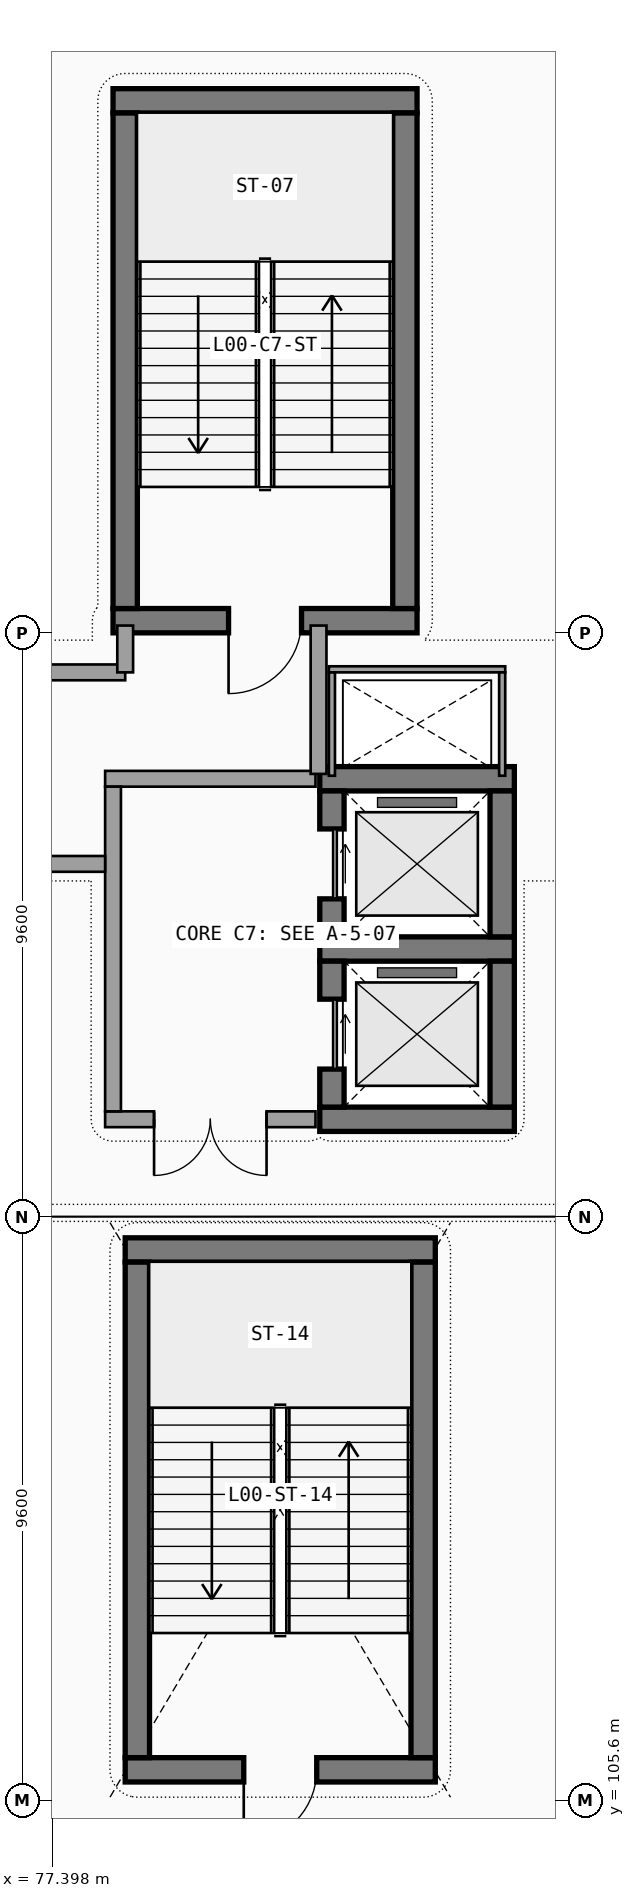
"""IFC4 building model, lengths in metres.
Left out: names, types, materials, properties, quantities, classifications, styles, units other than length and angle.
Written with IfcOpenShell. Run it as: python <this file> out.ifc"""

import sys

from ifc_helpers import new_model, si_unit, direction, frame, frame_2d, origin, place, context, subcontext, project, spatial, rectangle, extrude, element, fill, save


model = new_model("IFC4")
c1 = context("Model", 3, precision=1e-05, world=origin(), true_north=direction((0.0, 1.0)))
c2 = subcontext(c1, "Body", "Model", "MODEL_VIEW")
j1 = project(units=[si_unit("LENGTHUNIT", "METRE"), si_unit("PLANEANGLEUNIT", "RADIAN")], contexts=[c1])
p1 = place(None, origin())
s1 = spatial("IfcSite", under=j1, at=p1, CompositionType="ELEMENT")
p2 = place(p1, origin())
s2 = spatial("IfcBuilding", under=s1, at=p2, CompositionType="ELEMENT")
p3 = place(p2, origin())
s3 = spatial("IfcBuildingStorey", under=s2, at=p3, CompositionType="ELEMENT", Elevation=0.0)
p4 = place(p3, frame((78.4, 125.0, 0.0), z_axis=(0.0, 0.0, 1.0), x_axis=(1.0, 0.0, 0.0)))
e1 = element("IfcWall", 1, at=p4, inside=s3, PredefinedType="SHEAR", context=c2, shape_type="SweptSolid", body=[
    extrude(rectangle(XDim=5.0, YDim=0.4, at=frame_2d((2.5, 0.0))), origin(), (0.0, 0.0, 1.0), 4.5),
])
p5 = place(p4, frame((3.1, 0.0, 0.0), z_axis=(0.0, 0.0, 1.0), x_axis=(-1.0, 0.0, 0.0)))
e2 = element("IfcOpeningElement", 2, at=p5, cuts=e1, PredefinedType="OPENING", context=c2, shape_type="SweptSolid", body=[
    extrude(rectangle(XDim=1.2, YDim=2.2, at=frame_2d((0.6, 1.1))), frame((0.0, 0.21, 0.0), z_axis=(0.0, -1.0, 0.0), x_axis=(1.0, 0.0, 0.0)), (0.0, 0.0, 1.0), 0.42),
])
p6 = place(p3, frame((83.4, 133.55, 0.0), z_axis=(0.0, 0.0, 1.0), x_axis=(-1.0, 0.0, 0.0)))
e3 = element("IfcWall", 3, at=p6, inside=s3, PredefinedType="SHEAR", context=c2, shape_type="SweptSolid", body=[
    extrude(rectangle(XDim=5.0, YDim=0.4, at=frame_2d((2.5, 0.0))), origin(), (0.0, 0.0, 1.0), 4.5),
])
for number, where, z_axis, x_axis in (
    (4, (78.6, 133.35, 0.0), (0.0, 0.0, 1.0), (0.0, -1.0, 0.0)),
    (5, (83.2, 125.2, 0.0), (0.0, 0.0, 1.0), (0.0, 1.0, 0.0)),
):
    element("IfcWall", number, at=place(p3, frame(where, z_axis=z_axis, x_axis=x_axis)), inside=s3, PredefinedType="SHEAR", context=c2, shape_type="SweptSolid", body=[
        extrude(rectangle(XDim=8.15, YDim=0.4, at=frame_2d((4.075, 0.0))), origin(), (0.0, 0.0, 1.0), 4.5),
    ])
for number, where, z_axis, x_axis in (
    (6, (81.8, 116.8, 0.0), (0.0, 0.0, 1.0), (1.0, 0.0, 0.0)),
    (7, (85.0, 119.6, 0.0), (0.0, 0.0, 1.0), (-1.0, 0.0, 0.0)),
):
    element("IfcWall", number, at=place(p3, frame(where, z_axis=z_axis, x_axis=x_axis)), inside=s3, PredefinedType="SHEAR", context=c2, shape_type="SweptSolid", body=[
        extrude(rectangle(XDim=3.2, YDim=0.4, at=frame_2d((1.6, 0.0))), origin(), (0.0, 0.0, 1.0), 4.5),
    ])
p7 = place(p3, frame((82.0, 119.4, 0.0), z_axis=(0.0, 0.0, 1.0), x_axis=(0.0, -1.0, 0.0)))
e8 = element("IfcWall", 8, at=p7, inside=s3, PredefinedType="SHEAR", context=c2, shape_type="SweptSolid", body=[
    extrude(rectangle(XDim=2.4, YDim=0.4, at=frame_2d((1.2, 0.0))), origin(), (0.0, 0.0, 1.0), 4.5),
])
p8 = place(p7, frame((0.625, 0.0, 0.0), z_axis=(0.0, 0.0, 1.0), x_axis=(1.0, 0.0, 0.0)))
e9 = element("IfcOpeningElement", 9, at=p8, cuts=e8, PredefinedType="OPENING", context=c2, shape_type="SweptSolid", body=[
    extrude(rectangle(XDim=1.15, YDim=2.2, at=frame_2d((0.575, 1.1))), frame((0.0, 0.21, 0.0), z_axis=(0.0, -1.0, 0.0), x_axis=(1.0, 0.0, 0.0)), (0.0, 0.0, 1.0), 0.42),
])
p9 = place(p3, frame((84.8, 117.0, 0.0), z_axis=(0.0, 0.0, 1.0), x_axis=(0.0, 1.0, 0.0)))
e10 = element("IfcWall", 10, at=p9, inside=s3, PredefinedType="SHEAR", context=c2, shape_type="SweptSolid", body=[
    extrude(rectangle(XDim=2.4, YDim=0.4, at=frame_2d((1.2, 0.0))), origin(), (0.0, 0.0, 1.0), 4.5),
])
p10 = place(p3, frame((85.0, 122.4, 0.0), z_axis=(0.0, 0.0, 1.0), x_axis=(-1.0, 0.0, 0.0)))
e11 = element("IfcWall", 11, at=p10, inside=s3, PredefinedType="SHEAR", context=c2, shape_type="SweptSolid", body=[
    extrude(rectangle(XDim=3.2, YDim=0.4, at=frame_2d((1.6, 0.0))), origin(), (0.0, 0.0, 1.0), 4.5),
])
p11 = place(p3, frame((82.0, 122.2, 0.0), z_axis=(0.0, 0.0, 1.0), x_axis=(0.0, -1.0, 0.0)))
e12 = element("IfcWall", 12, at=p11, inside=s3, PredefinedType="SHEAR", context=c2, shape_type="SweptSolid", body=[
    extrude(rectangle(XDim=2.4, YDim=0.4, at=frame_2d((1.2, 0.0))), origin(), (0.0, 0.0, 1.0), 4.5),
])
p12 = place(p11, frame((0.625, 0.0, 0.0), z_axis=(0.0, 0.0, 1.0), x_axis=(1.0, 0.0, 0.0)))
e13 = element("IfcOpeningElement", 13, at=p12, cuts=e12, PredefinedType="OPENING", context=c2, shape_type="SweptSolid", body=[
    extrude(rectangle(XDim=1.15, YDim=2.2, at=frame_2d((0.575, 1.1))), frame((0.0, 0.21, 0.0), z_axis=(0.0, -1.0, 0.0), x_axis=(1.0, 0.0, 0.0)), (0.0, 0.0, 1.0), 0.42),
])
p13 = place(p3, frame((84.8, 119.8, 0.0), z_axis=(0.0, 0.0, 1.0), x_axis=(0.0, 1.0, 0.0)))
e14 = element("IfcWall", 14, at=p13, inside=s3, PredefinedType="SHEAR", context=c2, shape_type="SweptSolid", body=[
    extrude(rectangle(XDim=2.4, YDim=0.4, at=frame_2d((1.2, 0.0))), origin(), (0.0, 0.0, 1.0), 4.5),
])
p14 = place(p3, frame((84.85, 124.2, 0.0), z_axis=(0.0, 0.0, 1.0), x_axis=(-1.0, 0.0, 0.0)))
e15 = element("IfcWall", 15, at=p14, inside=s3, PredefinedType="PARTITIONING", context=c2, shape_type="SweptSolid", body=[
    extrude(rectangle(XDim=2.9, YDim=0.1, at=frame_2d((1.45, 0.0))), origin(), (0.0, 0.0, 1.0), 4.5),
])
for number, where, z_axis, x_axis in (
    (16, (82.0, 124.15, 0.0), (0.0, 0.0, 1.0), (0.0, -1.0, 0.0)),
    (17, (84.8, 122.45, 0.0), (0.0, 0.0, 1.0), (0.0, 1.0, 0.0)),
):
    element("IfcWall", number, at=place(p3, frame(where, z_axis=z_axis, x_axis=x_axis)), inside=s3, PredefinedType="PARTITIONING", context=c2, shape_type="SweptSolid", body=[
        extrude(rectangle(XDim=1.7, YDim=0.1, at=frame_2d((0.85, 0.0))), origin(), (0.0, 0.0, 1.0), 4.5),
    ])
p15 = place(p3, frame((78.27, 116.8, 0.0), z_axis=(0.0, 0.0, 1.0), x_axis=(1.0, 0.0, 0.0)))
e18 = element("IfcWall", 18, at=p15, inside=s3, PredefinedType="SOLIDWALL", context=c2, shape_type="SweptSolid", body=[
    extrude(rectangle(XDim=3.46, YDim=0.26, at=frame_2d((1.73, 0.0))), origin(), (0.0, 0.0, 1.0), 4.5),
])
p16 = place(p15, frame((2.655, 0.0, 0.0), z_axis=(0.0, 0.0, 1.0), x_axis=(-1.0, 0.0, 0.0)))
e19 = element("IfcOpeningElement", 19, at=p16, cuts=e18, PredefinedType="OPENING", context=c2, shape_type="SweptSolid", body=[
    extrude(rectangle(XDim=1.85, YDim=2.25, at=frame_2d((0.925, 1.125))), frame((0.0, 0.14, 0.0), z_axis=(0.0, -1.0, 0.0), x_axis=(1.0, 0.0, 0.0)), (0.0, 0.0, 1.0), 0.28),
])
p17 = place(p3, frame((81.73, 122.4, 0.0), z_axis=(0.0, 0.0, 1.0), x_axis=(-1.0, 0.0, 0.0)))
e20 = element("IfcWall", 20, at=p17, inside=s3, PredefinedType="SOLIDWALL", context=c2, shape_type="SweptSolid", body=[
    extrude(rectangle(XDim=3.46, YDim=0.26, at=frame_2d((1.73, 0.0))), origin(), (0.0, 0.0, 1.0), 4.5),
])
p18 = place(p3, frame((78.4, 122.27, 0.0), z_axis=(0.0, 0.0, 1.0), x_axis=(0.0, -1.0, 0.0)))
e21 = element("IfcWall", 21, at=p18, inside=s3, PredefinedType="SOLIDWALL", context=c2, shape_type="SweptSolid", body=[
    extrude(rectangle(XDim=5.34, YDim=0.26, at=frame_2d((2.67, 0.0))), origin(), (0.0, 0.0, 1.0), 4.5),
])
p19 = place(p3, frame((78.6, 106.1, 0.0), z_axis=(0.0, 0.0, 1.0), x_axis=(1.0, 0.0, 0.0)))
e22 = element("IfcWall", 22, at=p19, inside=s3, PredefinedType="SHEAR", context=c2, shape_type="SweptSolid", body=[
    extrude(rectangle(XDim=5.1, YDim=0.4, at=frame_2d((2.55, 0.0))), origin(), (0.0, 0.0, 1.0), 4.5),
])
p20 = place(p19, frame((3.15, 0.0, 0.0), z_axis=(0.0, 0.0, 1.0), x_axis=(-1.0, 0.0, 0.0)))
e23 = element("IfcOpeningElement", 23, at=p20, cuts=e22, PredefinedType="OPENING", context=c2, shape_type="SweptSolid", body=[
    extrude(rectangle(XDim=1.2, YDim=2.2, at=frame_2d((0.6, 1.1))), frame((0.0, 0.21, 0.0), z_axis=(0.0, -1.0, 0.0), x_axis=(1.0, 0.0, 0.0)), (0.0, 0.0, 1.0), 0.42),
])
p21 = place(p3, frame((83.7, 114.65, 0.0), z_axis=(0.0, 0.0, 1.0), x_axis=(-1.0, 0.0, 0.0)))
e24 = element("IfcWall", 24, at=p21, inside=s3, PredefinedType="SHEAR", context=c2, shape_type="SweptSolid", body=[
    extrude(rectangle(XDim=5.1, YDim=0.4, at=frame_2d((2.55, 0.0))), origin(), (0.0, 0.0, 1.0), 4.5),
])
for number, where, z_axis, x_axis in (
    (25, (78.8, 114.45, 0.0), (0.0, 0.0, 1.0), (0.0, -1.0, 0.0)),
    (26, (83.5, 106.3, 0.0), (0.0, 0.0, 1.0), (0.0, 1.0, 0.0)),
):
    element("IfcWall", number, at=place(p3, frame(where, z_axis=z_axis, x_axis=x_axis)), inside=s3, PredefinedType="SHEAR", context=c2, shape_type="SweptSolid", body=[
        extrude(rectangle(XDim=8.15, YDim=0.4, at=frame_2d((4.075, 0.0))), origin(), (0.0, 0.0, 1.0), 4.5),
    ])
p22 = place(p3, frame((67.54, 121.0, 0.0), z_axis=(0.0, 0.0, 1.0), x_axis=(1.0, 0.0, 0.0)))
e27 = element("IfcWall", 27, at=p22, inside=s3, PredefinedType="SOLIDWALL", context=c2, shape_type="SweptSolid", body=[
    extrude(rectangle(XDim=10.73, YDim=0.26, at=frame_2d((5.365, 0.0))), origin(), (0.0, 0.0, 1.0), 3.7),
])
p23 = place(p3, frame((67.54, 124.15, 0.0), z_axis=(0.0, 0.0, 1.0), x_axis=(1.0, 0.0, 0.0)))
e28 = element("IfcWall", 28, at=p23, inside=s3, PredefinedType="SOLIDWALL", context=c2, shape_type="SweptSolid", body=[
    extrude(rectangle(XDim=11.06, YDim=0.26, at=frame_2d((5.53, 0.0))), origin(), (0.0, 0.0, 1.0), 3.7),
])
p24 = place(p3, frame((78.6, 124.15, 0.0), z_axis=(0.0, 0.0, 1.0), x_axis=(0.0, 1.0, 0.0)))
e29 = element("IfcWall", 29, at=p24, inside=s3, PredefinedType="SOLIDWALL", context=c2, shape_type="SweptSolid", body=[
    extrude(rectangle(XDim=0.77, YDim=0.26, at=frame_2d((0.385, 0.0))), origin(), (0.0, 0.0, 1.0), 3.664),
])
p25 = place(p3, frame((81.78, 122.48, 0.0), z_axis=(0.0, 0.0, 1.0), x_axis=(0.0, 1.0, 0.0)))
e30 = element("IfcWall", 30, at=p25, inside=s3, PredefinedType="SOLIDWALL", context=c2, shape_type="SweptSolid", body=[
    extrude(rectangle(XDim=2.44, YDim=0.26, at=frame_2d((1.22, 0.0))), origin(), (0.0, 0.0, 1.0), 3.664),
])
p26 = place(p5, origin())
e31 = element("IfcDoor", 31, at=p26, inside=s3, OperationType="SINGLE_SWING_RIGHT", PredefinedType="DOOR", context=c2, shape_type="SweptSolid", body=[
    extrude(rectangle(XDim=1.2, YDim=2.2, at=frame_2d((0.6, 1.1))), frame((0.0, 0.025, 0.0), z_axis=(0.0, -1.0, 0.0), x_axis=(1.0, 0.0, 0.0)), (0.0, 0.0, 1.0), 0.05),
])
fill(e2, e31)
p27 = place(p8, origin())
e32 = element("IfcDoor", 32, at=p27, inside=s3, OperationType="SLIDING_TO_LEFT", PredefinedType="DOOR", context=c2, shape_type="SweptSolid", body=[
    extrude(rectangle(XDim=1.15, YDim=2.2, at=frame_2d((0.575, 1.1))), frame((0.0, 0.025, 0.0), z_axis=(0.0, -1.0, 0.0), x_axis=(1.0, 0.0, 0.0)), (0.0, 0.0, 1.0), 0.05),
])
fill(e9, e32)
p28 = place(p12, origin())
e33 = element("IfcDoor", 33, at=p28, inside=s3, OperationType="SLIDING_TO_LEFT", PredefinedType="DOOR", context=c2, shape_type="SweptSolid", body=[
    extrude(rectangle(XDim=1.15, YDim=2.2, at=frame_2d((0.575, 1.1))), frame((0.0, 0.025, 0.0), z_axis=(0.0, -1.0, 0.0), x_axis=(1.0, 0.0, 0.0)), (0.0, 0.0, 1.0), 0.05),
])
fill(e13, e33)
p29 = place(p16, origin())
e34 = element("IfcDoor", 34, at=p29, inside=s3, OperationType="DOUBLE_DOOR_SINGLE_SWING", PredefinedType="DOOR", context=c2, shape_type="SweptSolid", body=[
    extrude(rectangle(XDim=1.85, YDim=2.25, at=frame_2d((0.925, 1.125))), frame((0.0, 0.025, 0.0), z_axis=(0.0, -1.0, 0.0), x_axis=(1.0, 0.0, 0.0)), (0.0, 0.0, 1.0), 0.05),
])
fill(e19, e34)
p30 = place(p20, origin())
e35 = element("IfcDoor", 35, at=p30, inside=s3, OperationType="SINGLE_SWING_RIGHT", PredefinedType="DOOR", context=c2, shape_type="SweptSolid", body=[
    extrude(rectangle(XDim=1.2, YDim=2.2, at=frame_2d((0.6, 1.1))), frame((0.0, 0.025, 0.0), z_axis=(0.0, -1.0, 0.0), x_axis=(1.0, 0.0, 0.0)), (0.0, 0.0, 1.0), 0.05),
])
fill(e23, e35)
save(model, sys.argv[1])
